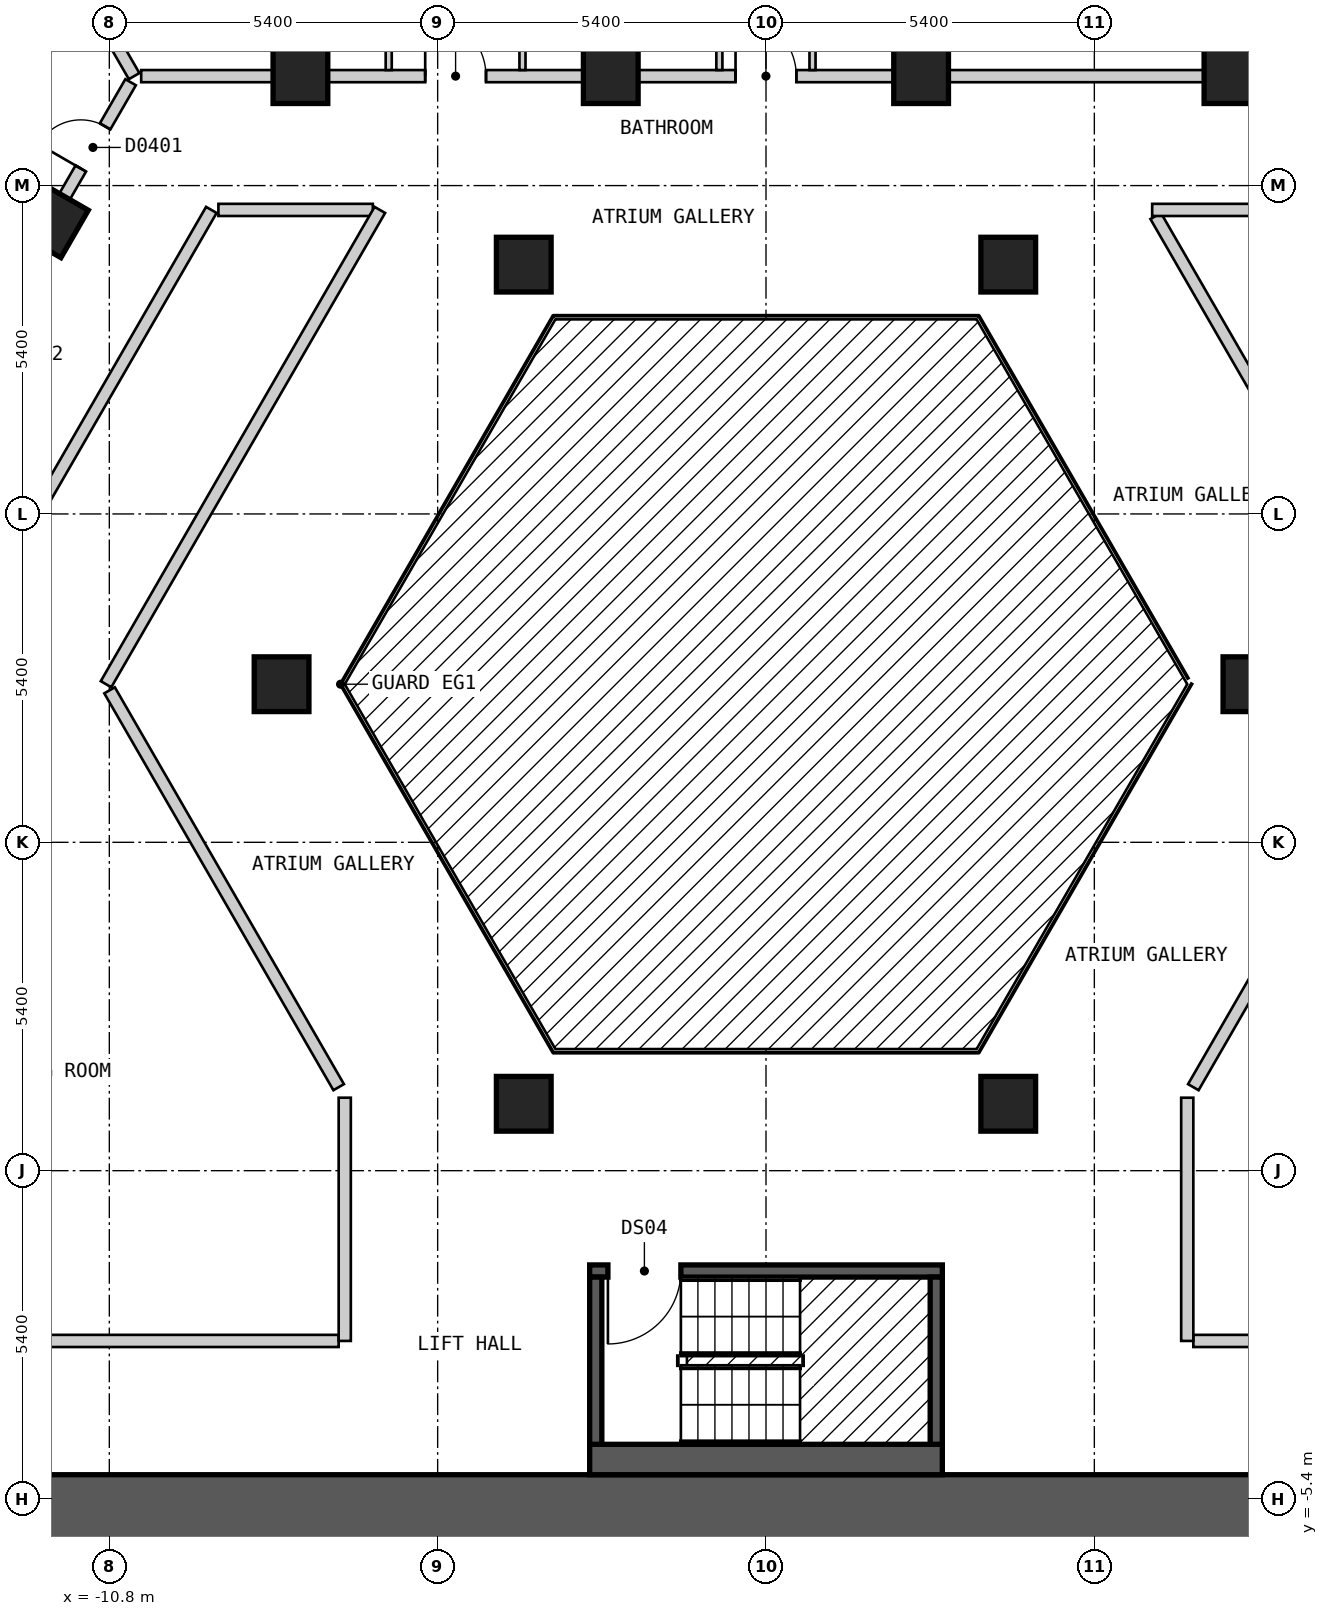
"""IFC4 building model, lengths in metres.
Left out: names, types, materials, properties, quantities, classifications, styles, units other than length and angle.
Written with IfcOpenShell. Run it as: python <this file> out.ifc"""

import sys

from ifc_helpers import new_model, si_unit, direction, frame, frame_2d, origin, origin_2d, place, context, subcontext, project, spatial, rectangle, extrude, element, fill, save


model = new_model("IFC4")
c1 = context("Model", 3, precision=1e-05, world=origin(), true_north=direction((0.0, 1.0)))
c2 = subcontext(c1, "Body", "Model", "MODEL_VIEW")
j1 = project(units=[si_unit("LENGTHUNIT", "METRE"), si_unit("PLANEANGLEUNIT", "RADIAN")], contexts=[c1])
p1 = place(None, origin())
s1 = spatial("IfcSite", under=j1, at=p1, CompositionType="ELEMENT")
p2 = place(p1, origin())
s2 = spatial("IfcBuilding", under=s1, at=p2, CompositionType="ELEMENT")
p3 = place(p2, frame((0.0, 0.0, 38.4)))
s3 = spatial("IfcBuildingStorey", under=s2, at=p3, CompositionType="ELEMENT", Elevation=38.4)
for number, where, z_axis, x_axis in (
    (1, (3.984, 1.1, 0.0), (0.0, 0.0, 1.0), (1.0, 0.0, 0.0)),
    (2, (7.967, 8.0, 0.0), (0.0, 0.0, 1.0), (1.0, 0.0, 0.0)),
    (3, (7.655, 18.0, 0.0), (0.0, 0.0, 1.0), (-1.0, 0.0, 0.0)),
    (4, (3.984, 14.9, 0.0), (0.0, 0.0, 1.0), (1.0, 0.0, 0.0)),
    (5, (2.551, 18.0, 0.0), (0.0, 0.0, 1.0), (-1.0, 0.0, 0.0)),
    (6, (-2.553, 18.0, 0.0), (0.0, 0.0, 1.0), (-1.0, 0.0, 0.0)),
    (7, (-3.984, 14.9, 0.0), (0.0, 0.0, 1.0), (1.0, 0.0, 0.0)),
    (8, (-7.657, 18.0, 0.0), (0.0, 0.0, 1.0), (-1.0, 0.0, 0.0)),
    (9, (-11.761, 15.63, 0.0), (0.0, 0.0, 1.0), (-0.5, -0.866, 0.0)),
    (10, (-7.967, 8.0, 0.0), (0.0, 0.0, 1.0), (1.0, 0.0, 0.0)),
    (11, (-3.984, 1.1, 0.0), (0.0, 0.0, 1.0), (1.0, 0.0, 0.0)),
):
    element("IfcColumn", number, at=place(p3, frame(where, z_axis=z_axis, x_axis=x_axis)), inside=s3, PredefinedType="COLUMN", context=c2, shape_type="SweptSolid", body=[
        extrude(rectangle(XDim=0.9, YDim=0.9, at=origin_2d()), origin(), (0.0, 0.0, 1.0), 3.0),
    ])
p4 = place(p3, frame((-13.3, -5.6, 0.0), z_axis=(0.0, 0.0, 1.0), x_axis=(1.0, 0.0, 0.0)))
e12 = element("IfcWall", 12, at=p4, inside=s3, PredefinedType="SHEAR", context=c2, shape_type="SweptSolid", body=[
    extrude(rectangle(XDim=26.6, YDim=1.2, at=frame_2d((13.3, 0.0))), origin(), (0.0, 0.0, 1.0), 2.7),
])
p5 = place(p4, frame((23.65, 0.0, 0.0)))
e13 = element("IfcOpeningElement", 13, at=p5, cuts=e12, PredefinedType="OPENING", context=c2, shape_type="SweptSolid", body=[
    extrude(rectangle(XDim=1.2, YDim=2.1, at=frame_2d((0.6, 1.05))), frame((0.0, 0.61, 0.0), z_axis=(0.0, -1.0, 0.0), x_axis=(1.0, 0.0, 0.0)), (0.0, 0.0, 1.0), 1.22),
])
p6 = place(p3, frame((-2.9, -4.75, 0.0), z_axis=(0.0, 0.0, 1.0), x_axis=(1.0, 0.0, 0.0)))
e14 = element("IfcWall", 14, at=p6, inside=s3, PredefinedType="SOLIDWALL", context=c2, shape_type="SweptSolid", body=[
    extrude(rectangle(XDim=5.8, YDim=0.5, at=frame_2d((2.9, 0.0))), origin(), (0.0, 0.0, 1.0), 2.7),
])
p7 = place(p3, frame((-2.9, -1.65, 0.0), z_axis=(0.0, 0.0, 1.0), x_axis=(1.0, 0.0, 0.0)))
e15 = element("IfcWall", 15, at=p7, inside=s3, PredefinedType="SOLIDWALL", context=c2, shape_type="SweptSolid", body=[
    extrude(rectangle(XDim=5.8, YDim=0.2, at=frame_2d((2.9, 0.0))), origin(), (0.0, 0.0, 1.0), 2.7),
])
p8 = place(p7, frame((0.3, 0.0, 0.0)))
e16 = element("IfcOpeningElement", 16, at=p8, cuts=e15, PredefinedType="OPENING", context=c2, shape_type="SweptSolid", body=[
    extrude(rectangle(XDim=1.2, YDim=2.1, at=frame_2d((0.6, 1.05))), frame((0.0, 0.11, 0.0), z_axis=(0.0, -1.0, 0.0), x_axis=(1.0, 0.0, 0.0)), (0.0, 0.0, 1.0), 0.22),
])
for number, where, z_axis, x_axis in (
    (17, (-2.8, -4.5, 0.0), (0.0, 0.0, 1.0), (0.0, 1.0, 0.0)),
    (18, (2.8, -4.5, 0.0), (0.0, 0.0, 1.0), (0.0, 1.0, 0.0)),
):
    element("IfcWall", number, at=place(p3, frame(where, z_axis=z_axis, x_axis=x_axis)), inside=s3, PredefinedType="SOLIDWALL", context=c2, shape_type="SweptSolid", body=[
        extrude(rectangle(XDim=2.75, YDim=0.2, at=frame_2d((1.375, 0.0))), origin(), (0.0, 0.0, 1.0), 2.7),
    ])
p9 = place(p3, frame((-10.796, 7.9, 0.0), z_axis=(0.0, 0.0, 1.0), x_axis=(0.499954271211, -0.866051803703, 0.0)))
e19 = element("IfcWall", 19, at=p9, inside=s3, PredefinedType="PARTITIONING", context=c2, shape_type="SweptSolid", body=[
    extrude(rectangle(XDim=7.536, YDim=0.2, at=frame_2d((3.768, 0.0))), origin(), (0.0, 0.0, 1.0), 2.7),
])
p10 = place(p3, frame((6.409, 15.7, 0.0), z_axis=(0.0, 0.0, 1.0), x_axis=(0.499930377127, -0.866065596838, 0.0)))
e20 = element("IfcWall", 20, at=p10, inside=s3, PredefinedType="PARTITIONING", context=c2, shape_type="SweptSolid", body=[
    extrude(rectangle(XDim=8.775, YDim=0.2, at=frame_2d((4.388, 0.0))), origin(), (0.0, 0.0, 1.0), 2.7),
])
for number, where, z_axis, x_axis in (
    (21, (-15.4, -2.8, 0.0), (0.0, 0.0, 1.0), (1.0, 0.0, 0.0)),
    (22, (7.028, -2.8, 0.0), (0.0, 0.0, 1.0), (1.0, 0.0, 0.0)),
):
    element("IfcWall", number, at=place(p3, frame(where, z_axis=z_axis, x_axis=x_axis)), inside=s3, PredefinedType="PARTITIONING", context=c2, shape_type="SweptSolid", body=[
        extrude(rectangle(XDim=8.372, YDim=0.2, at=frame_2d((4.186, 0.0))), origin(), (0.0, 0.0, 1.0), 2.7),
    ])
p11 = place(p3, frame((-9.006, 15.8, 0.0), z_axis=(0.0, 0.0, 1.0), x_axis=(1.0, 0.0, 0.0)))
e23 = element("IfcWall", 23, at=p11, inside=s3, PredefinedType="PARTITIONING", context=c2, shape_type="SweptSolid", body=[
    extrude(rectangle(XDim=2.54, YDim=0.2, at=frame_2d((1.27, 0.0))), origin(), (0.0, 0.0, 1.0), 2.7),
])
p12 = place(p3, frame((6.351, 15.8, 0.0), z_axis=(0.0, 0.0, 1.0), x_axis=(1.0, 0.0, 0.0)))
e24 = element("IfcWall", 24, at=p12, inside=s3, PredefinedType="PARTITIONING", context=c2, shape_type="SweptSolid", body=[
    extrude(rectangle(XDim=2.771, YDim=0.2, at=frame_2d((1.385, 0.0))), origin(), (0.0, 0.0, 1.0), 2.7),
])
p13 = place(p3, frame((-10.276, 18.0, 0.0), z_axis=(0.0, 0.0, 1.0), x_axis=(1.0, 0.0, 0.0)))
e25 = element("IfcWall", 25, at=p13, inside=s3, PredefinedType="PARTITIONING", context=c2, shape_type="SweptSolid", body=[
    extrude(rectangle(XDim=20.5, YDim=0.2, at=frame_2d((10.25, 0.0))), origin(), (0.0, 0.0, 1.0), 2.7),
])
p14 = place(p13, frame((19.265, 0.0, 0.0)))
e26 = element("IfcOpeningElement", 26, at=p14, cuts=e25, PredefinedType="OPENING", context=c2, shape_type="SweptSolid", body=[
    extrude(rectangle(XDim=1.0, YDim=2.1, at=frame_2d((0.5, 1.05))), frame((0.0, 0.11, 0.0), z_axis=(0.0, -1.0, 0.0), x_axis=(1.0, 0.0, 0.0)), (0.0, 0.0, 1.0), 0.22),
])
p15 = place(p13, frame((9.775, 0.0, 0.0)))
e27 = element("IfcOpeningElement", 27, at=p15, cuts=e25, PredefinedType="OPENING", context=c2, shape_type="SweptSolid", body=[
    extrude(rectangle(XDim=1.0, YDim=2.1, at=frame_2d((0.5, 1.05))), frame((0.0, 0.11, 0.0), z_axis=(0.0, -1.0, 0.0), x_axis=(1.0, 0.0, 0.0)), (0.0, 0.0, 1.0), 0.22),
])
p16 = place(p13, frame((4.671, 0.0, 0.0)))
e28 = element("IfcOpeningElement", 28, at=p16, cuts=e25, PredefinedType="OPENING", context=c2, shape_type="SweptSolid", body=[
    extrude(rectangle(XDim=1.0, YDim=2.1, at=frame_2d((0.5, 1.05))), frame((0.0, 0.11, 0.0), z_axis=(0.0, -1.0, 0.0), x_axis=(1.0, 0.0, 0.0)), (0.0, 0.0, 1.0), 0.22),
])
p17 = place(p3, frame((7.028, 1.373, 0.0), z_axis=(0.0, 0.0, 1.0), x_axis=(0.49998574534, 0.86603363356, 0.0)))
e29 = element("IfcWall", 29, at=p17, inside=s3, PredefinedType="PARTITIONING", context=c2, shape_type="SweptSolid", body=[
    extrude(rectangle(XDim=7.652, YDim=0.2, at=frame_2d((3.826, 0.0))), origin(), (0.0, 0.0, 1.0), 2.7),
])
p18 = place(p3, frame((-10.854, 8.0, 0.0), z_axis=(0.0, 0.0, 1.0), x_axis=(0.499964141897, 0.86604610548, 0.0)))
e30 = element("IfcWall", 30, at=p18, inside=s3, PredefinedType="PARTITIONING", context=c2, shape_type="SweptSolid", body=[
    extrude(rectangle(XDim=9.007, YDim=0.2, at=frame_2d((4.503, 0.0))), origin(), (0.0, 0.0, 1.0), 2.7),
])
p19 = place(p3, frame((-18.244, -0.001, 0.0), z_axis=(0.0, 0.0, 1.0), x_axis=(0.499962999376, 0.866046765051, 0.0)))
e31 = element("IfcWall", 31, at=p19, inside=s3, PredefinedType="PARTITIONING", context=c2, shape_type="SweptSolid", body=[
    extrude(rectangle(XDim=18.245, YDim=0.2, at=frame_2d((9.123, 0.0))), origin(), (0.0, 0.0, 1.0), 2.7),
])
p20 = place(p19, frame((8.672, 0.0, 0.0)))
e32 = element("IfcOpeningElement", 32, at=p20, cuts=e31, PredefinedType="OPENING", context=c2, shape_type="SweptSolid", body=[
    extrude(rectangle(XDim=0.9, YDim=2.1, at=frame_2d((0.45, 1.05))), frame((0.0, 0.11, 0.0), z_axis=(0.0, -1.0, 0.0), x_axis=(1.0, 0.0, 0.0)), (0.0, 0.0, 1.0), 0.22),
])
p21 = place(p3, frame((-20.727, 0.099, 0.0), z_axis=(0.0, 0.0, 1.0), x_axis=(0.499993204491, 0.866029327138, 0.0)))
e33 = element("IfcWall", 33, at=p21, inside=s3, PredefinedType="PARTITIONING", context=c2, shape_type="SweptSolid", body=[
    extrude(rectangle(XDim=20.554, YDim=0.2, at=frame_2d((10.277, 0.0))), origin(), (0.0, 0.0, 1.0), 2.7),
])
p22 = place(p21, frame((18.916, 0.0, 0.0)))
e34 = element("IfcOpeningElement", 34, at=p22, cuts=e33, PredefinedType="OPENING", context=c2, shape_type="SweptSolid", body=[
    extrude(rectangle(XDim=0.8, YDim=2.1, at=frame_2d((0.4, 1.05))), frame((0.0, 0.11, 0.0), z_axis=(0.0, -1.0, 0.0), x_axis=(1.0, 0.0, 0.0)), (0.0, 0.0, 1.0), 0.22),
])
p23 = place(p21, frame((14.88, 0.0, 0.0)))
e35 = element("IfcOpeningElement", 35, at=p23, cuts=e33, PredefinedType="OPENING", context=c2, shape_type="SweptSolid", body=[
    extrude(rectangle(XDim=1.0, YDim=2.1, at=frame_2d((0.5, 1.05))), frame((0.0, 0.11, 0.0), z_axis=(0.0, -1.0, 0.0), x_axis=(1.0, 0.0, 0.0)), (0.0, 0.0, 1.0), 0.22),
])
p24 = place(p21, frame((9.776, 0.0, 0.0)))
e36 = element("IfcOpeningElement", 36, at=p24, cuts=e33, PredefinedType="OPENING", context=c2, shape_type="SweptSolid", body=[
    extrude(rectangle(XDim=1.0, YDim=2.1, at=frame_2d((0.5, 1.05))), frame((0.0, 0.11, 0.0), z_axis=(0.0, -1.0, 0.0), x_axis=(1.0, 0.0, 0.0)), (0.0, 0.0, 1.0), 0.22),
])
p25 = place(p21, frame((4.673, 0.0, 0.0)))
e37 = element("IfcOpeningElement", 37, at=p25, cuts=e33, PredefinedType="OPENING", context=c2, shape_type="SweptSolid", body=[
    extrude(rectangle(XDim=1.0, YDim=2.1, at=frame_2d((0.5, 1.05))), frame((0.0, 0.11, 0.0), z_axis=(0.0, -1.0, 0.0), x_axis=(1.0, 0.0, 0.0)), (0.0, 0.0, 1.0), 0.22),
])
p26 = place(p21, frame((0.838, 0.0, 0.0)))
e38 = element("IfcOpeningElement", 38, at=p26, cuts=e33, PredefinedType="OPENING", context=c2, shape_type="SweptSolid", body=[
    extrude(rectangle(XDim=0.8, YDim=2.1, at=frame_2d((0.4, 1.05))), frame((0.0, 0.11, 0.0), z_axis=(0.0, -1.0, 0.0), x_axis=(1.0, 0.0, 0.0)), (0.0, 0.0, 1.0), 0.22),
])
for number, where, z_axis, x_axis in (
    (39, (6.928, -2.8, 0.0), (0.0, 0.0, 1.0), (0.0, 1.0, 0.0)),
    (40, (-6.928, -2.8, 0.0), (0.0, 0.0, 1.0), (0.0, 1.0, 0.0)),
):
    element("IfcWall", number, at=place(p3, frame(where, z_axis=z_axis, x_axis=x_axis)), inside=s3, PredefinedType="PARTITIONING", context=c2, shape_type="SweptSolid", body=[
        extrude(rectangle(XDim=4.0, YDim=0.2, at=frame_2d((2.0, 0.0))), origin(), (0.0, 0.0, 1.0), 2.7),
    ])
p27 = place(p3, frame((0.765, 20.609, 0.0), z_axis=(0.0, 0.0, 1.0), x_axis=(0.0, -1.0, 0.0)))
e41 = element("IfcWall", 41, at=p27, inside=s3, PredefinedType="PARTITIONING", context=c2, shape_type="SweptSolid", body=[
    extrude(rectangle(XDim=2.509, YDim=0.1, at=frame_2d((1.254, 0.0))), origin(), (0.0, 0.0, 1.0), 2.7),
])
p28 = place(p27, frame((0.829, 0.0, 0.0)))
e42 = element("IfcOpeningElement", 42, at=p28, cuts=e41, PredefinedType="OPENING", context=c2, shape_type="SweptSolid", body=[
    extrude(rectangle(XDim=0.9, YDim=2.1, at=frame_2d((0.45, 1.05))), frame((0.0, 0.06, 0.0), z_axis=(0.0, -1.0, 0.0), x_axis=(1.0, 0.0, 0.0)), (0.0, 0.0, 1.0), 0.12),
])
p29 = place(p3, frame((2.551, 18.1, 0.0), z_axis=(0.0, 0.0, 1.0), x_axis=(0.0, 1.0, 0.0)))
e43 = element("IfcWall", 43, at=p29, inside=s3, PredefinedType="PARTITIONING", context=c2, shape_type="SweptSolid", body=[
    extrude(rectangle(XDim=3.5, YDim=0.1, at=frame_2d((1.75, 0.0))), origin(), (0.0, 0.0, 1.0), 2.7),
])
p30 = place(p3, frame((-4.005, 18.1, 0.0), z_axis=(0.0, 0.0, 1.0), x_axis=(0.0, 1.0, 0.0)))
e44 = element("IfcWall", 44, at=p30, inside=s3, PredefinedType="PARTITIONING", context=c2, shape_type="SweptSolid", body=[
    extrude(rectangle(XDim=4.05, YDim=0.1, at=frame_2d((2.025, 0.0))), origin(), (0.0, 0.0, 1.0), 2.7),
])
p31 = place(p30, frame((1.6, 0.0, 0.0)))
e45 = element("IfcOpeningElement", 45, at=p31, cuts=e44, PredefinedType="OPENING", context=c2, shape_type="SweptSolid", body=[
    extrude(rectangle(XDim=0.8, YDim=2.1, at=frame_2d((0.4, 1.05))), frame((0.0, 0.06, 0.0), z_axis=(0.0, -1.0, 0.0), x_axis=(1.0, 0.0, 0.0)), (0.0, 0.0, 1.0), 0.12),
])
p32 = place(p3, frame((-6.205, 18.1, 0.0), z_axis=(0.0, 0.0, 1.0), x_axis=(0.0, 1.0, 0.0)))
e46 = element("IfcWall", 46, at=p32, inside=s3, PredefinedType="PARTITIONING", context=c2, shape_type="SweptSolid", body=[
    extrude(rectangle(XDim=4.05, YDim=0.1, at=frame_2d((2.025, 0.0))), origin(), (0.0, 0.0, 1.0), 2.7),
])
p33 = place(p32, frame((1.55, 0.0, 0.0)))
e47 = element("IfcOpeningElement", 47, at=p33, cuts=e46, PredefinedType="OPENING", context=c2, shape_type="SweptSolid", body=[
    extrude(rectangle(XDim=0.9, YDim=2.1, at=frame_2d((0.45, 1.05))), frame((0.0, 0.06, 0.0), z_axis=(0.0, -1.0, 0.0), x_axis=(1.0, 0.0, 0.0)), (0.0, 0.0, 1.0), 0.12),
])
p34 = place(p3, frame((-7.657, 18.1, 0.0), z_axis=(0.0, 0.0, 1.0), x_axis=(0.0, 1.0, 0.0)))
e48 = element("IfcWall", 48, at=p34, inside=s3, PredefinedType="PARTITIONING", context=c2, shape_type="SweptSolid", body=[
    extrude(rectangle(XDim=4.1, YDim=0.1, at=frame_2d((2.05, 0.0))), origin(), (0.0, 0.0, 1.0), 2.7),
])
p35 = place(p3, frame((-0.767, 18.1, 0.0), z_axis=(0.0, 0.0, 1.0), x_axis=(0.0, 1.0, 0.0)))
e49 = element("IfcWall", 49, at=p35, inside=s3, PredefinedType="PARTITIONING", context=c2, shape_type="SweptSolid", body=[
    extrude(rectangle(XDim=2.51, YDim=0.1, at=frame_2d((1.255, 0.0))), origin(), (0.0, 0.0, 1.0), 2.7),
])
p36 = place(p35, frame((0.83, 0.0, 0.0)))
e50 = element("IfcOpeningElement", 50, at=p36, cuts=e49, PredefinedType="OPENING", context=c2, shape_type="SweptSolid", body=[
    extrude(rectangle(XDim=0.8, YDim=2.1, at=frame_2d((0.4, 1.05))), frame((0.0, 0.06, 0.0), z_axis=(0.0, -1.0, 0.0), x_axis=(1.0, 0.0, 0.0)), (0.0, 0.0, 1.0), 0.12),
])
p37 = place(p3, frame((-12.659, 21.926, 0.0), z_axis=(0.0, 0.0, 1.0), x_axis=(0.500025458316, -0.86601070492, 0.0)))
e51 = element("IfcWall", 51, at=p37, inside=s3, PredefinedType="PARTITIONING", context=c2, shape_type="SweptSolid", body=[
    extrude(rectangle(XDim=4.533, YDim=0.2, at=frame_2d((2.267, 0.0))), origin(), (0.0, 0.0, 1.0), 2.7),
])
p38 = place(p3, frame((7.655, 21.62, 0.0), z_axis=(0.0, 0.0, 1.0), x_axis=(0.0, -1.0, 0.0)))
e52 = element("IfcWall", 52, at=p38, inside=s3, PredefinedType="PARTITIONING", context=c2, shape_type="SweptSolid", body=[
    extrude(rectangle(XDim=3.52, YDim=0.2, at=frame_2d((1.76, 0.0))), origin(), (0.0, 0.0, 1.0), 2.7),
])
p39 = place(p3, frame((-2.553, 18.1, 0.0), z_axis=(0.0, 0.0, 1.0), x_axis=(0.0, 1.0, 0.0)))
e53 = element("IfcWall", 53, at=p39, inside=s3, PredefinedType="PARTITIONING", context=c2, shape_type="SweptSolid", body=[
    extrude(rectangle(XDim=2.56, YDim=0.2, at=frame_2d((1.28, 0.0))), origin(), (0.0, 0.0, 1.0), 2.7),
])
p40 = place(p8, origin())
e54 = element("IfcDoor", 54, at=p40, inside=s3, OperationType="SINGLE_SWING_LEFT", PredefinedType="DOOR", context=c2, shape_type="SweptSolid", body=[
    extrude(rectangle(XDim=1.2, YDim=2.1, at=frame_2d((0.6, 1.05))), frame((0.0, 0.025, 0.0), z_axis=(0.0, -1.0, 0.0), x_axis=(1.0, 0.0, 0.0)), (0.0, 0.0, 1.0), 0.05),
])
fill(e16, e54)
p41 = place(p22, origin())
e55 = element("IfcDoor", 55, at=p41, inside=s3, OperationType="SINGLE_SWING_LEFT", PredefinedType="DOOR", context=c2, shape_type="SweptSolid", body=[
    extrude(rectangle(XDim=0.8, YDim=2.1, at=frame_2d((0.4, 1.05))), frame((0.0, 0.025, 0.0), z_axis=(0.0, -1.0, 0.0), x_axis=(1.0, 0.0, 0.0)), (0.0, 0.0, 1.0), 0.05),
])
fill(e34, e55)
p42 = place(p15, origin())
e56 = element("IfcDoor", 56, at=p42, inside=s3, OperationType="SINGLE_SWING_LEFT", PredefinedType="DOOR", context=c2, shape_type="SweptSolid", body=[
    extrude(rectangle(XDim=1.0, YDim=2.1, at=frame_2d((0.5, 1.05))), frame((0.0, 0.025, 0.0), z_axis=(0.0, -1.0, 0.0), x_axis=(1.0, 0.0, 0.0)), (0.0, 0.0, 1.0), 0.05),
])
fill(e27, e56)
p43 = place(p16, origin())
e57 = element("IfcDoor", 57, at=p43, inside=s3, OperationType="SINGLE_SWING_LEFT", PredefinedType="DOOR", context=c2, shape_type="SweptSolid", body=[
    extrude(rectangle(XDim=1.0, YDim=2.1, at=frame_2d((0.5, 1.05))), frame((0.0, 0.025, 0.0), z_axis=(0.0, -1.0, 0.0), x_axis=(1.0, 0.0, 0.0)), (0.0, 0.0, 1.0), 0.05),
])
fill(e28, e57)
save(model, sys.argv[1])
